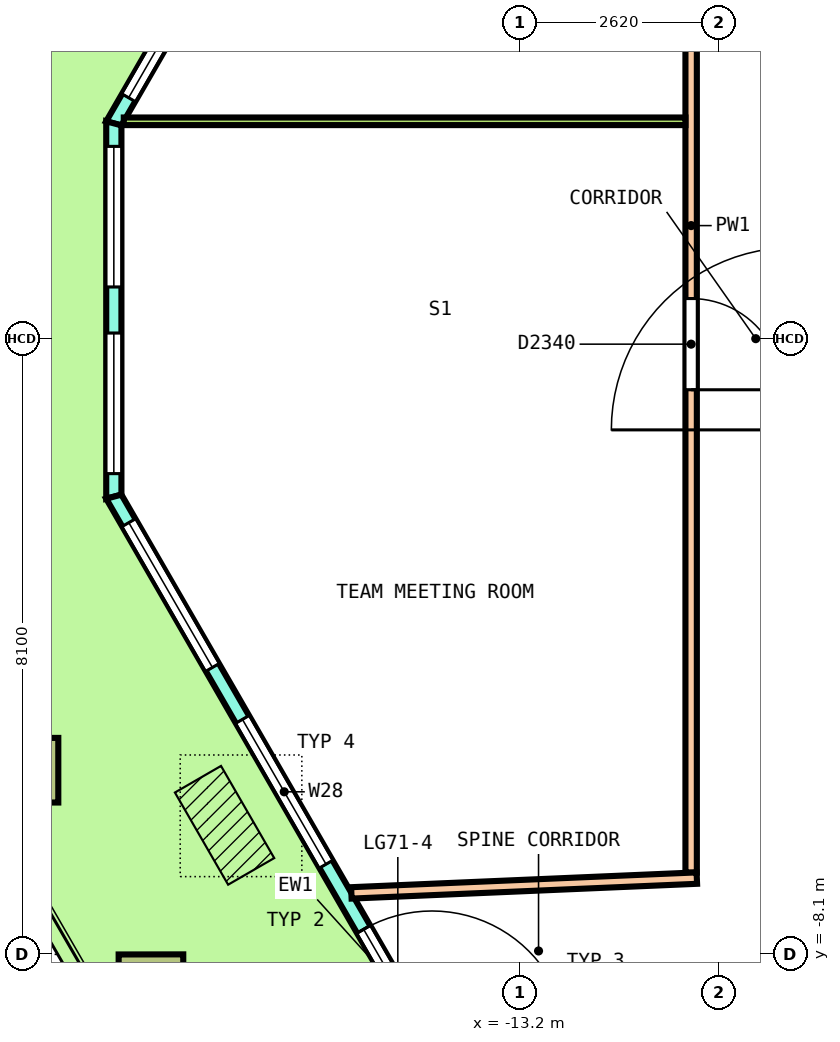
"""IFC4 building model, lengths in metres.
Left out: names, types, materials, properties, quantities, classifications, styles, units other than length and angle.
Written with IfcOpenShell. Run it as: python <this file> out.ifc"""

import sys

from ifc_helpers import new_model, si_unit, direction, frame, frame_2d, origin, origin_2d, place, context, subcontext, project, spatial, polyline, rectangle, outline, extrude, element, fill, save


model = new_model("IFC4")
c1 = context("Model", 3, precision=1e-05, world=origin(), true_north=direction((0.0, 1.0)))
c2 = subcontext(c1, "Body", "Model", "MODEL_VIEW")
j1 = project(units=[si_unit("LENGTHUNIT", "METRE"), si_unit("PLANEANGLEUNIT", "RADIAN")], contexts=[c1])
p1 = place(None, origin())
s1 = spatial("IfcSite", under=j1, at=p1, CompositionType="ELEMENT")
p2 = place(p1, origin())
s2 = spatial("IfcBuilding", under=s1, at=p2, CompositionType="ELEMENT")
p3 = place(p2, frame((0.0, 0.0, 320.6)))
s3 = spatial("IfcBuildingStorey", under=s2, at=p3, CompositionType="ELEMENT", Elevation=320.6)
p4 = place(p3, frame((-19.701, -5.677, 0.0), z_axis=(-0.010900409442, 0.01892525075, 0.999761479533), x_axis=(0.49889855577, -0.866385160892, 0.021839964222)))
e1 = element("IfcColumn", 1, at=p4, inside=s3, PredefinedType="COLUMN", context=c2, shape_type="SweptSolid", body=[
    extrude(rectangle(XDim=0.85, YDim=0.85, at=origin_2d()), origin(), (0.0, 0.0, 1.0), 3.651),
])
p5 = place(p3, frame((-18.056, -8.526, 0.0), z_axis=(-0.003611943648, 0.006354345307, 0.999973287723), x_axis=(0.495427452012, -0.86861856765, 0.007309153601)))
e2 = element("IfcColumn", 2, at=p5, inside=s3, PredefinedType="COLUMN", context=c2, shape_type="SweptSolid", body=[
    extrude(rectangle(XDim=0.85, YDim=0.85, at=origin_2d()), origin(), (0.0, 0.0, 1.0), 3.65),
])
p6 = place(p3, frame((-11.726, 14.644, 0.0), z_axis=(0.0, 0.0, 1.0), x_axis=(-0.49999155959, -0.866030276803, 0.0)))
e3 = element("IfcWall", 3, at=p6, inside=s3, PredefinedType="SOLIDWALL", context=c2, shape_type="SweptSolid", body=[
    extrude(outline(polyline([(-0.027, -0.1), (1.026, -0.1), (2.08, -0.1), (3.133, -0.1), (4.186, -0.1), (5.239, -0.1), (6.292, -0.1), (7.346, -0.1), (8.399, -0.1), (9.452, -0.1), (10.506, -0.1), (11.559, -0.1), (12.612, -0.1), (13.665, -0.1), (13.612, 0.1), (12.567, 0.1), (11.522, 0.1), (10.477, 0.1), (9.432, 0.1), (8.387, 0.1), (7.342, 0.1), (6.297, 0.1), (5.252, 0.1), (4.207, 0.1), (3.162, 0.1), (2.117, 0.1), (1.072, 0.1), (0.027, 0.1), (-0.027, -0.1)])), origin(), (0.0, 0.0, 1.0), 3.7),
])
p7 = place(p6, frame((0.389, 0.0, 0.1)))
e4 = element("IfcOpeningElement", 4, at=p7, cuts=e3, PredefinedType="OPENING", context=c2, shape_type="SweptSolid", body=[
    extrude(rectangle(XDim=1.95, YDim=2.9, at=frame_2d((0.975, 1.45))), frame((0.0, 0.11, 0.0), z_axis=(0.0, -1.0, 0.0), x_axis=(1.0, 0.0, 0.0)), (0.0, 0.0, 1.0), 0.22),
])
p8 = place(p6, frame((3.116, 0.0, 0.1)))
e5 = element("IfcOpeningElement", 5, at=p8, cuts=e3, PredefinedType="OPENING", context=c2, shape_type="SweptSolid", body=[
    extrude(rectangle(XDim=1.95, YDim=2.9, at=frame_2d((0.975, 1.45))), frame((0.0, 0.11, 0.0), z_axis=(0.0, -1.0, 0.0), x_axis=(1.0, 0.0, 0.0)), (0.0, 0.0, 1.0), 0.22),
])
p9 = place(p6, frame((5.919, 0.0, 0.0)))
e6 = element("IfcOpeningElement", 6, at=p9, cuts=e3, PredefinedType="OPENING", context=c2, shape_type="SweptSolid", body=[
    extrude(rectangle(XDim=1.8, YDim=2.4, at=frame_2d((0.9, 1.2))), frame((0.0, 0.11, 0.0), z_axis=(0.0, -1.0, 0.0), x_axis=(1.0, 0.0, 0.0)), (0.0, 0.0, 1.0), 0.22),
])
p10 = place(p6, frame((5.919, 0.0, 2.55)))
e7 = element("IfcOpeningElement", 7, at=p10, cuts=e3, PredefinedType="OPENING", context=c2, shape_type="SweptSolid", body=[
    extrude(rectangle(XDim=1.8, YDim=0.45, at=frame_2d((0.9, 0.225))), frame((0.0, 0.11, 0.0), z_axis=(0.0, -1.0, 0.0), x_axis=(1.0, 0.0, 0.0)), (0.0, 0.0, 1.0), 0.22),
])
p11 = place(p6, frame((8.572, 0.0, 0.1)))
e8 = element("IfcOpeningElement", 8, at=p11, cuts=e3, PredefinedType="OPENING", context=c2, shape_type="SweptSolid", body=[
    extrude(rectangle(XDim=1.95, YDim=2.9, at=frame_2d((0.975, 1.45))), frame((0.0, 0.11, 0.0), z_axis=(0.0, -1.0, 0.0), x_axis=(1.0, 0.0, 0.0)), (0.0, 0.0, 1.0), 0.22),
])
p12 = place(p6, frame((11.3, 0.0, 0.1)))
e9 = element("IfcOpeningElement", 9, at=p12, cuts=e3, PredefinedType="OPENING", context=c2, shape_type="SweptSolid", body=[
    extrude(rectangle(XDim=1.95, YDim=2.9, at=frame_2d((0.975, 1.45))), frame((0.0, 0.11, 0.0), z_axis=(0.0, -1.0, 0.0), x_axis=(1.0, 0.0, 0.0)), (0.0, 0.0, 1.0), 0.22),
])
p13 = place(p3, frame((-18.545, 2.833, 0.0), z_axis=(0.0, 0.0, 1.0), x_axis=(0.0, -1.0, 0.0)))
e10 = element("IfcWall", 10, at=p13, inside=s3, PredefinedType="SOLIDWALL", context=c2, shape_type="SweptSolid", body=[
    extrude(outline(polyline([(-0.027, -0.1), (1.214, -0.1), (2.456, -0.1), (3.697, -0.1), (4.938, -0.1), (4.885, 0.1), (3.67, 0.1), (2.456, 0.1), (1.241, 0.1), (0.027, 0.1), (-0.027, -0.1)])), origin(), (0.0, 0.0, 1.0), 3.7),
])
p14 = place(p13, frame((0.303, 0.0, 0.1)))
e11 = element("IfcOpeningElement", 11, at=p14, cuts=e10, PredefinedType="OPENING", context=c2, shape_type="SweptSolid", body=[
    extrude(rectangle(XDim=1.85, YDim=2.9, at=frame_2d((0.925, 1.45))), frame((0.0, 0.11, 0.0), z_axis=(0.0, -1.0, 0.0), x_axis=(1.0, 0.0, 0.0)), (0.0, 0.0, 1.0), 0.22),
])
p15 = place(p13, frame((2.759, 0.0, 0.1)))
e12 = element("IfcOpeningElement", 12, at=p15, cuts=e10, PredefinedType="OPENING", context=c2, shape_type="SweptSolid", body=[
    extrude(rectangle(XDim=1.85, YDim=2.9, at=frame_2d((0.925, 1.45))), frame((0.0, 0.11, 0.0), z_axis=(0.0, -1.0, 0.0), x_axis=(1.0, 0.0, 0.0)), (0.0, 0.0, 1.0), 0.22),
])
p16 = place(p3, frame((-18.545, -2.079, 0.0), z_axis=(0.0, 0.0, 1.0), x_axis=(0.499999144553, -0.866025897676, 0.0)))
e13 = element("IfcWall", 13, at=p16, inside=s3, PredefinedType="SOLIDWALL", context=c2, shape_type="SweptSolid", body=[
    extrude(outline(polyline([(-0.027, -0.1), (1.044, -0.1), (2.116, -0.1), (3.187, -0.1), (4.259, -0.1), (5.33, -0.1), (6.401, -0.1), (7.472, -0.1), (8.544, -0.1), (9.615, -0.1), (10.686, -0.1), (11.758, -0.1), (12.829, -0.1), (13.9, -0.1), (14.972, -0.1), (14.918, 0.1), (13.854, 0.1), (12.791, 0.1), (11.727, 0.1), (10.663, 0.1), (9.6, 0.1), (8.536, 0.1), (7.472, 0.1), (6.409, 0.1), (5.345, 0.1), (4.281, 0.1), (3.218, 0.1), (2.154, 0.1), (1.091, 0.1), (0.027, 0.1), (-0.027, -0.1)])), origin(), (0.0, 0.0, 1.0), 3.7),
])
p17 = place(p16, frame((0.395, 0.0, 0.1)))
e14 = element("IfcOpeningElement", 14, at=p17, cuts=e13, PredefinedType="OPENING", context=c2, shape_type="SweptSolid", body=[
    extrude(rectangle(XDim=2.2, YDim=2.9, at=frame_2d((1.1, 1.45))), frame((0.0, 0.11, 0.0), z_axis=(0.0, -1.0, 0.0), x_axis=(1.0, 0.0, 0.0)), (0.0, 0.0, 1.0), 0.22),
])
p18 = place(p16, frame((3.384, 0.0, 0.1)))
e15 = element("IfcOpeningElement", 15, at=p18, cuts=e13, PredefinedType="OPENING", context=c2, shape_type="SweptSolid", body=[
    extrude(rectangle(XDim=2.2, YDim=2.9, at=frame_2d((1.1, 1.45))), frame((0.0, 0.11, 0.0), z_axis=(0.0, -1.0, 0.0), x_axis=(1.0, 0.0, 0.0)), (0.0, 0.0, 1.0), 0.22),
])
p19 = place(p16, frame((6.573, 0.0, 0.0)))
e16 = element("IfcOpeningElement", 16, at=p19, cuts=e13, PredefinedType="OPENING", context=c2, shape_type="SweptSolid", body=[
    extrude(rectangle(XDim=1.8, YDim=2.4, at=frame_2d((0.9, 1.2))), frame((0.0, 0.11, 0.0), z_axis=(0.0, -1.0, 0.0), x_axis=(1.0, 0.0, 0.0)), (0.0, 0.0, 1.0), 0.22),
])
p20 = place(p16, frame((6.573, 0.0, 2.55)))
e17 = element("IfcOpeningElement", 17, at=p20, cuts=e13, PredefinedType="OPENING", context=c2, shape_type="SweptSolid", body=[
    extrude(rectangle(XDim=1.8, YDim=0.45, at=frame_2d((0.9, 0.225))), frame((0.0, 0.11, 0.0), z_axis=(0.0, -1.0, 0.0), x_axis=(1.0, 0.0, 0.0)), (0.0, 0.0, 1.0), 0.22),
])
p21 = place(p16, frame((9.361, 0.0, 0.1)))
e18 = element("IfcOpeningElement", 18, at=p21, cuts=e13, PredefinedType="OPENING", context=c2, shape_type="SweptSolid", body=[
    extrude(rectangle(XDim=2.2, YDim=2.9, at=frame_2d((1.1, 1.45))), frame((0.0, 0.11, 0.0), z_axis=(0.0, -1.0, 0.0), x_axis=(1.0, 0.0, 0.0)), (0.0, 0.0, 1.0), 0.22),
])
p22 = place(p16, frame((12.35, 0.0, 0.1)))
e19 = element("IfcOpeningElement", 19, at=p22, cuts=e13, PredefinedType="OPENING", context=c2, shape_type="SweptSolid", body=[
    extrude(rectangle(XDim=2.2, YDim=2.9, at=frame_2d((1.1, 1.45))), frame((0.0, 0.11, 0.0), z_axis=(0.0, -1.0, 0.0), x_axis=(1.0, 0.0, 0.0)), (0.0, 0.0, 1.0), 0.22),
])
p23 = place(p3, frame((-10.95, -7.025, 0.0), z_axis=(0.0, 0.0, 1.0), x_axis=(0.0, 1.0, 0.0)))
e20 = element("IfcWall", 20, at=p23, inside=s3, PredefinedType="PARTITIONING", context=c2, shape_type="SweptSolid", body=[
    extrude(rectangle(XDim=17.025, YDim=0.15, at=frame_2d((8.512, 0.0))), origin(), (0.0, 0.0, 1.0), 3.05),
])
p24 = place(p23, frame((11.756, 0.0, 0.0)))
e21 = element("IfcOpeningElement", 21, at=p24, cuts=e20, PredefinedType="OPENING", context=c2, shape_type="SweptSolid", body=[
    extrude(rectangle(XDim=1.0, YDim=2.1, at=frame_2d((0.5, 1.05))), frame((0.0, 0.085, 0.0), z_axis=(0.0, -1.0, 0.0), x_axis=(1.0, 0.0, 0.0)), (0.0, 0.0, 1.0), 0.17),
])
p25 = place(p23, frame((6.353, 0.0, 0.0)))
e22 = element("IfcOpeningElement", 22, at=p25, cuts=e20, PredefinedType="OPENING", context=c2, shape_type="SweptSolid", body=[
    extrude(rectangle(XDim=1.2, YDim=2.1, at=frame_2d((0.6, 1.05))), frame((0.0, 0.085, 0.0), z_axis=(0.0, -1.0, 0.0), x_axis=(1.0, 0.0, 0.0)), (0.0, 0.0, 1.0), 0.17),
])
p26 = place(p3, frame((-15.42, -7.292, 0.0), z_axis=(0.0, 0.0, 1.0), x_axis=(0.999082600631, 0.042824725536, 0.0)))
e23 = element("IfcWall", 23, at=p26, inside=s3, PredefinedType="PARTITIONING", context=c2, shape_type="SweptSolid", body=[
    extrude(rectangle(XDim=4.549, YDim=0.15, at=frame_2d((2.275, 0.0))), origin(), (0.0, 0.0, 1.0), 3.05),
])
p27 = place(p3, frame((-18.414, 2.86, 0.0), z_axis=(0.0, 0.0, 1.0), x_axis=(1.0, 0.0, 0.0)))
e24 = element("IfcWall", 24, at=p27, inside=s3, PredefinedType="PARTITIONING", context=c2, shape_type="SweptSolid", body=[
    extrude(rectangle(XDim=7.389, YDim=0.1, at=frame_2d((3.695, 0.0))), origin(), (0.0, 0.0, 1.0), 3.05),
])
p28 = place(p12, origin())
e25 = element("IfcWindow", 25, at=p28, inside=s3, PartitioningType="SINGLE_PANEL", PredefinedType="WINDOW", context=c2, shape_type="SweptSolid", body=[
    extrude(rectangle(XDim=1.95, YDim=2.9, at=frame_2d((0.975, 1.45))), frame((0.0, 0.03, 0.0), z_axis=(0.0, -1.0, 0.0), x_axis=(1.0, 0.0, 0.0)), (0.0, 0.0, 1.0), 0.06),
])
fill(e9, e25)
p29 = place(p14, origin())
e26 = element("IfcWindow", 26, at=p29, inside=s3, PartitioningType="SINGLE_PANEL", PredefinedType="WINDOW", context=c2, shape_type="SweptSolid", body=[
    extrude(rectangle(XDim=1.85, YDim=2.9, at=frame_2d((0.925, 1.45))), frame((0.0, 0.03, 0.0), z_axis=(0.0, -1.0, 0.0), x_axis=(1.0, 0.0, 0.0)), (0.0, 0.0, 1.0), 0.06),
])
fill(e11, e26)
p30 = place(p15, origin())
e27 = element("IfcWindow", 27, at=p30, inside=s3, PartitioningType="SINGLE_PANEL", PredefinedType="WINDOW", context=c2, shape_type="SweptSolid", body=[
    extrude(rectangle(XDim=1.85, YDim=2.9, at=frame_2d((0.925, 1.45))), frame((0.0, 0.03, 0.0), z_axis=(0.0, -1.0, 0.0), x_axis=(1.0, 0.0, 0.0)), (0.0, 0.0, 1.0), 0.06),
])
fill(e12, e27)
p31 = place(p17, origin())
e28 = element("IfcWindow", 28, at=p31, inside=s3, PartitioningType="SINGLE_PANEL", PredefinedType="WINDOW", context=c2, shape_type="SweptSolid", body=[
    extrude(rectangle(XDim=2.2, YDim=2.9, at=frame_2d((1.1, 1.45))), frame((0.0, 0.03, 0.0), z_axis=(0.0, -1.0, 0.0), x_axis=(1.0, 0.0, 0.0)), (0.0, 0.0, 1.0), 0.06),
])
fill(e14, e28)
p32 = place(p18, origin())
e29 = element("IfcWindow", 29, at=p32, inside=s3, PartitioningType="SINGLE_PANEL", PredefinedType="WINDOW", context=c2, shape_type="SweptSolid", body=[
    extrude(rectangle(XDim=2.2, YDim=2.9, at=frame_2d((1.1, 1.45))), frame((0.0, 0.03, 0.0), z_axis=(0.0, -1.0, 0.0), x_axis=(1.0, 0.0, 0.0)), (0.0, 0.0, 1.0), 0.06),
])
fill(e15, e29)
p33 = place(p19, origin())
e30 = element("IfcDoor", 30, at=p33, inside=s3, OperationType="DOUBLE_DOOR_SINGLE_SWING", PredefinedType="DOOR", context=c2, shape_type="SweptSolid", body=[
    extrude(rectangle(XDim=1.8, YDim=2.4, at=frame_2d((0.9, 1.2))), frame((0.0, 0.025, 0.0), z_axis=(0.0, -1.0, 0.0), x_axis=(1.0, 0.0, 0.0)), (0.0, 0.0, 1.0), 0.05),
])
fill(e16, e30)
p34 = place(p20, origin())
e31 = element("IfcWindow", 31, at=p34, inside=s3, PartitioningType="SINGLE_PANEL", PredefinedType="WINDOW", context=c2, shape_type="SweptSolid", body=[
    extrude(rectangle(XDim=1.8, YDim=0.45, at=frame_2d((0.9, 0.225))), frame((0.0, 0.03, 0.0), z_axis=(0.0, -1.0, 0.0), x_axis=(1.0, 0.0, 0.0)), (0.0, 0.0, 1.0), 0.06),
])
fill(e17, e31)
p35 = place(p25, origin())
e32 = element("IfcDoor", 32, at=p35, inside=s3, OperationType="DOUBLE_DOOR_SINGLE_SWING", PredefinedType="DOOR", context=c2, shape_type="SweptSolid", body=[
    extrude(rectangle(XDim=1.2, YDim=2.1, at=frame_2d((0.6, 1.05))), frame((0.0, 0.025, 0.0), z_axis=(0.0, -1.0, 0.0), x_axis=(1.0, 0.0, 0.0)), (0.0, 0.0, 1.0), 0.05),
])
fill(e22, e32)
save(model, sys.argv[1])
